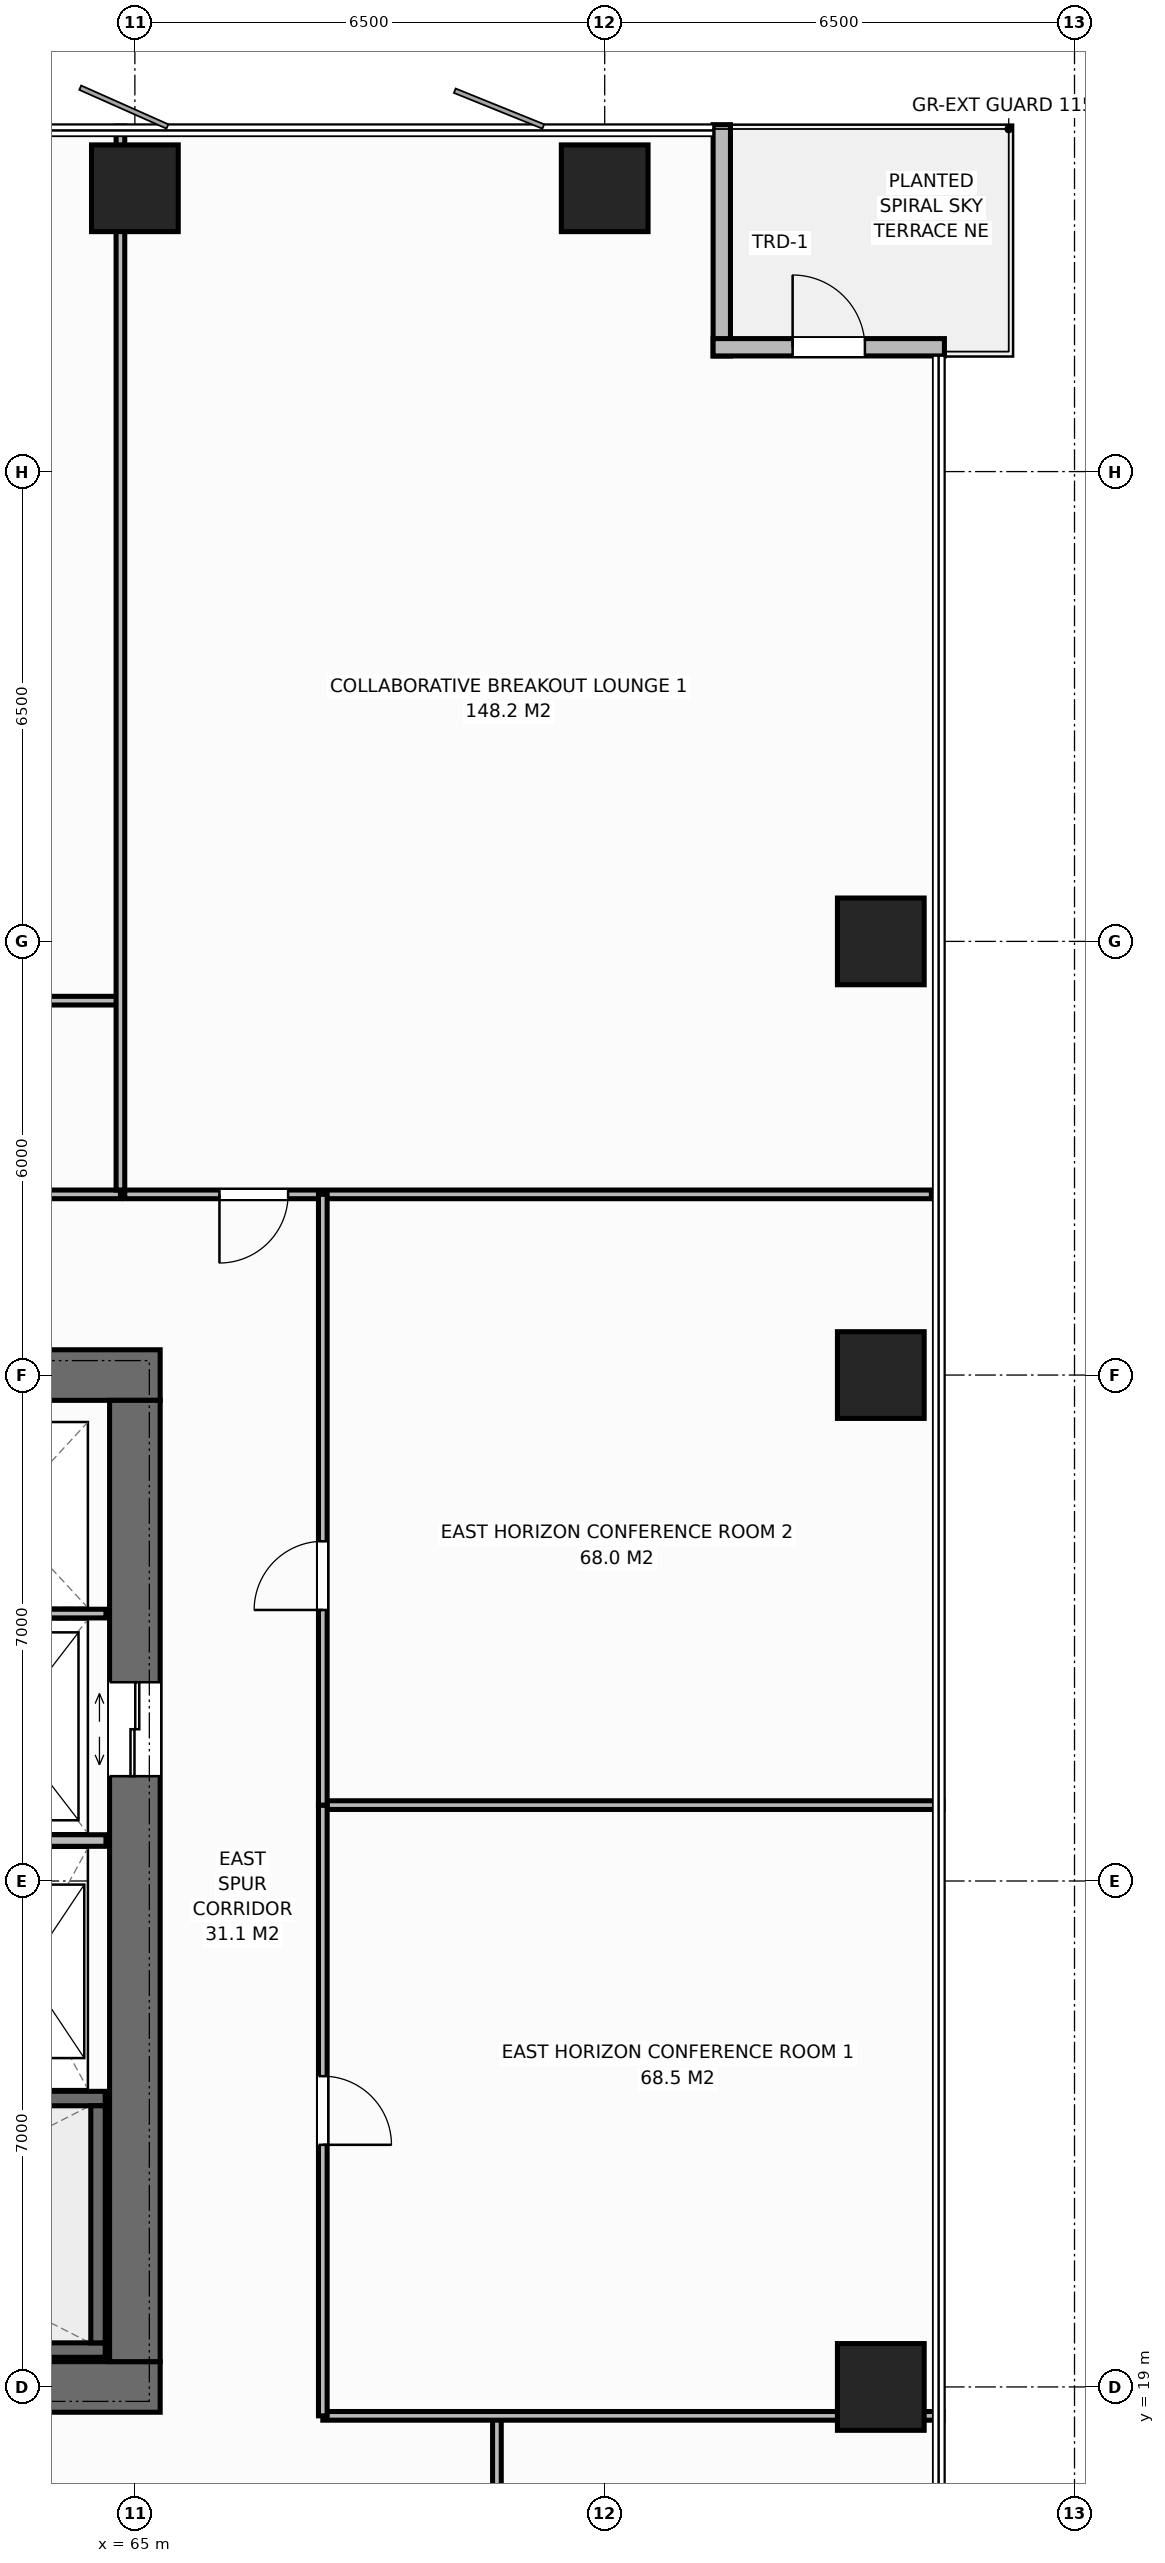
"""IFC4 building model, lengths in metres.
Left out: names, types, materials, properties, quantities, classifications, styles, units other than length and angle.
Written with IfcOpenShell. Run it as: python <this file> out.ifc"""

import sys

from ifc_helpers import new_model, si_unit, direction, frame, frame_2d, origin, origin_2d, place, context, subcontext, project, spatial, rectangle, extrude, element, fill, save


model = new_model("IFC4")
c1 = context("Model", 3, precision=1e-05, world=origin(), true_north=direction((0.0, 1.0)))
c2 = subcontext(c1, "Body", "Model", "MODEL_VIEW")
j1 = project(units=[si_unit("LENGTHUNIT", "METRE"), si_unit("PLANEANGLEUNIT", "RADIAN")], contexts=[c1])
p1 = place(None, origin())
s1 = spatial("IfcSite", under=j1, at=p1, CompositionType="ELEMENT")
p2 = place(p1, origin())
s2 = spatial("IfcBuilding", under=s1, at=p2, CompositionType="ELEMENT")
p3 = place(p2, frame((0.0, 0.0, 131.6)))
s3 = spatial("IfcBuildingStorey", under=s2, at=p3, CompositionType="ELEMENT", Elevation=131.6)
p4 = place(p3, frame((51.65, 19.0, 0.0), z_axis=(0.0, 0.0, 1.0), x_axis=(1.0, 0.0, 0.0)))
e1 = element("IfcWall", 1, at=p4, inside=s3, PredefinedType="SHEAR", context=c2, shape_type="SweptSolid", body=[
    extrude(rectangle(XDim=13.7, YDim=0.7, at=frame_2d((6.85, 0.0))), origin(), (0.0, 0.0, 1.0), 3.8),
])
p5 = place(p4, frame((3.07, 0.0, 0.0)))
e2 = element("IfcOpeningElement", 2, at=p5, cuts=e1, PredefinedType="OPENING", context=c2, shape_type="SweptSolid", body=[
    extrude(rectangle(XDim=1.4, YDim=2.2, at=frame_2d((0.7, 1.1))), frame((0.0, 0.36, 0.0), z_axis=(0.0, -1.0, 0.0), x_axis=(1.0, 0.0, 0.0)), (0.0, 0.0, 1.0), 0.72),
])
p6 = place(p3, frame((51.65, 33.0, 0.0), z_axis=(0.0, 0.0, 1.0), x_axis=(1.0, 0.0, 0.0)))
e3 = element("IfcWall", 3, at=p6, inside=s3, PredefinedType="SHEAR", context=c2, shape_type="SweptSolid", body=[
    extrude(rectangle(XDim=13.7, YDim=0.7, at=frame_2d((6.85, 0.0))), origin(), (0.0, 0.0, 1.0), 3.8),
])
p7 = place(p6, frame((3.07, 0.0, 0.0)))
e4 = element("IfcOpeningElement", 4, at=p7, cuts=e3, PredefinedType="OPENING", context=c2, shape_type="SweptSolid", body=[
    extrude(rectangle(XDim=1.4, YDim=2.2, at=frame_2d((0.7, 1.1))), frame((0.0, 0.36, 0.0), z_axis=(0.0, -1.0, 0.0), x_axis=(1.0, 0.0, 0.0)), (0.0, 0.0, 1.0), 0.72),
])
p8 = place(p6, frame((10.95, 0.0, 0.0)))
e5 = element("IfcOpeningElement", 5, at=p8, cuts=e3, PredefinedType="OPENING", context=c2, shape_type="SweptSolid", body=[
    extrude(rectangle(XDim=0.9, YDim=2.15, at=frame_2d((0.45, 1.075))), frame((0.0, 0.36, 0.0), z_axis=(0.0, -1.0, 0.0), x_axis=(1.0, 0.0, 0.0)), (0.0, 0.0, 1.0), 0.72),
])
p9 = place(p6, frame((5.9, 0.0, 0.0)))
e6 = element("IfcOpeningElement", 6, at=p9, cuts=e3, PredefinedType="OPENING", context=c2, shape_type="SweptSolid", body=[
    extrude(rectangle(XDim=0.9, YDim=2.15, at=frame_2d((0.45, 1.075))), frame((0.0, 0.36, 0.0), z_axis=(0.0, -1.0, 0.0), x_axis=(1.0, 0.0, 0.0)), (0.0, 0.0, 1.0), 0.72),
])
p10 = place(p6, frame((8.3, 0.0, 0.0)))
e7 = element("IfcOpeningElement", 7, at=p10, cuts=e3, PredefinedType="OPENING", context=c2, shape_type="SweptSolid", body=[
    extrude(rectangle(XDim=0.95, YDim=2.15, at=frame_2d((0.475, 1.075))), frame((0.0, 0.36, 0.0), z_axis=(0.0, -1.0, 0.0), x_axis=(1.0, 0.0, 0.0)), (0.0, 0.0, 1.0), 0.72),
])
p11 = place(p3, frame((65.0, 19.35, 0.0), z_axis=(0.0, 0.0, 1.0), x_axis=(0.0, 1.0, 0.0)))
e8 = element("IfcWall", 8, at=p11, inside=s3, PredefinedType="SHEAR", context=c2, shape_type="SweptSolid", body=[
    extrude(rectangle(XDim=13.3, YDim=0.7, at=frame_2d((6.65, 0.0))), origin(), (0.0, 0.0, 1.0), 3.8),
])
p12 = place(p11, frame((8.1, 0.0, 0.0)))
e9 = element("IfcOpeningElement", 9, at=p12, cuts=e8, PredefinedType="OPENING", context=c2, shape_type="SweptSolid", body=[
    extrude(rectangle(XDim=1.3, YDim=2.2, at=frame_2d((0.65, 1.1))), frame((0.0, 0.36, 0.0), z_axis=(0.0, -1.0, 0.0), x_axis=(1.0, 0.0, 0.0)), (0.0, 0.0, 1.0), 0.72),
])
p13 = place(p3, frame((56.16, 19.51, 0.0), z_axis=(0.0, 0.0, 1.0), x_axis=(1.0, 0.0, 0.0)))
e10 = element("IfcWall", 10, at=p13, inside=s3, PredefinedType="SHEAR", context=c2, shape_type="SweptSolid", body=[
    extrude(rectangle(XDim=8.43, YDim=0.2, at=frame_2d((4.215, 0.0))), origin(), (0.0, 0.0, 1.0), 3.8),
])
p14 = place(p3, frame((56.16, 22.99, 0.0), z_axis=(0.0, 0.0, 1.0), x_axis=(1.0, 0.0, 0.0)))
e11 = element("IfcWall", 11, at=p14, inside=s3, PredefinedType="SHEAR", context=c2, shape_type="SweptSolid", body=[
    extrude(rectangle(XDim=8.43, YDim=0.2, at=frame_2d((4.215, 0.0))), origin(), (0.0, 0.0, 1.0), 3.8),
])
p15 = place(p14, frame((0.45, 0.0, 0.0)))
e12 = element("IfcOpeningElement", 12, at=p15, cuts=e11, PredefinedType="OPENING", context=c2, shape_type="SweptSolid", body=[
    extrude(rectangle(XDim=1.0, YDim=2.15, at=frame_2d((0.5, 1.075))), frame((0.0, 0.11, 0.0), z_axis=(0.0, -1.0, 0.0), x_axis=(1.0, 0.0, 0.0)), (0.0, 0.0, 1.0), 0.22),
])
p16 = place(p3, frame((64.49, 19.61, 0.0), z_axis=(0.0, 0.0, 1.0), x_axis=(0.0, 1.0, 0.0)))
e13 = element("IfcWall", 13, at=p16, inside=s3, PredefinedType="SHEAR", context=c2, shape_type="SweptSolid", body=[
    extrude(rectangle(XDim=3.28, YDim=0.2, at=frame_2d((1.64, 0.0))), origin(), (0.0, 0.0, 1.0), 3.8),
])
for number, where, z_axis, x_axis in (
    (14, (65.0, 49.42, 0.0), (0.0, 0.0, 1.0), (1.0, 0.0, 0.0)),
    (15, (71.5, 49.42, 0.0), (0.0, 0.0, 1.0), (1.0, 0.0, 0.0)),
    (16, (75.32, 19.0, 0.0), (0.0, 0.0, 1.0), (1.0, 0.0, 0.0)),
    (17, (75.32, 33.0, 0.0), (0.0, 0.0, 1.0), (1.0, 0.0, 0.0)),
    (18, (75.32, 39.0, 0.0), (0.0, 0.0, 1.0), (1.0, 0.0, 0.0)),
):
    element("IfcColumn", number, at=place(p3, frame(where, z_axis=z_axis, x_axis=x_axis)), inside=s3, PredefinedType="COLUMN", context=c2, shape_type="SweptSolid", body=[
        extrude(rectangle(XDim=1.2, YDim=1.2, at=origin_2d()), origin(), (0.0, 0.0, 1.0), 3.8),
    ])
p17 = place(p3, frame((73.12, 50.3, 0.0), z_axis=(0.0, 0.0, 1.0), x_axis=(0.0, -1.0, 0.0)))
e19 = element("IfcWall", 19, at=p17, inside=s3, PredefinedType="STANDARD", context=c2, shape_type="SweptSolid", body=[
    extrude(rectangle(XDim=3.2, YDim=0.24, at=frame_2d((1.6, 0.0))), origin(), (0.0, 0.0, 1.0), 3.565),
])
p18 = place(p3, frame((73.0, 47.22, 0.0), z_axis=(0.0, 0.0, 1.0), x_axis=(1.0, 0.0, 0.0)))
e20 = element("IfcWall", 20, at=p18, inside=s3, PredefinedType="STANDARD", context=c2, shape_type="SweptSolid", body=[
    extrude(rectangle(XDim=3.2, YDim=0.24, at=frame_2d((1.6, 0.0))), origin(), (0.0, 0.0, 1.0), 3.565),
])
p19 = place(p18, frame((1.1, 0.0, 0.0)))
e21 = element("IfcOpeningElement", 21, at=p19, cuts=e20, PredefinedType="OPENING", context=c2, shape_type="SweptSolid", body=[
    extrude(rectangle(XDim=1.0, YDim=2.2, at=frame_2d((0.5, 1.1))), frame((0.0, 0.13, 0.0), z_axis=(0.0, -1.0, 0.0), x_axis=(1.0, 0.0, 0.0)), (0.0, 0.0, 1.0), 0.26),
])
p20 = place(p3, frame((56.26, 26.56, 0.0), z_axis=(0.0, 0.0, 1.0), x_axis=(1.0, 0.0, 0.0)))
e22 = element("IfcWall", 22, at=p20, inside=s3, PredefinedType="STANDARD", context=c2, shape_type="SweptSolid", body=[
    extrude(rectangle(XDim=8.34, YDim=0.16, at=frame_2d((4.17, 0.0))), origin(), (0.0, 0.0, 1.0), 3.565),
])
p21 = place(p3, frame((61.87, 29.7, 0.0), z_axis=(0.0, 0.0, 1.0), x_axis=(1.0, 0.0, 0.0)))
e23 = element("IfcWall", 23, at=p21, inside=s3, PredefinedType="PARTITIONING", context=c2, shape_type="SweptSolid", body=[
    extrude(rectangle(XDim=2.73, YDim=0.12, at=frame_2d((1.365, 0.0))), origin(), (0.0, 0.0, 1.0), 3.565),
])
p22 = place(p3, frame((70.009, 16.5, 0.0), z_axis=(0.0, 0.0, 1.0), x_axis=(0.0, 1.0, 0.0)))
e24 = element("IfcWall", 24, at=p22, inside=s3, PredefinedType="PARTITIONING", context=c2, shape_type="SweptSolid", body=[
    extrude(rectangle(XDim=2.1, YDim=0.12, at=frame_2d((1.05, 0.0))), origin(), (0.0, 0.0, 1.0), 3.565),
])
p23 = place(p3, frame((51.64, 35.5, 0.0), z_axis=(0.0, 0.0, 1.0), x_axis=(1.0, 0.0, 0.0)))
e25 = element("IfcWall", 25, at=p23, inside=s3, PredefinedType="PARTITIONING", context=c2, shape_type="SweptSolid", body=[
    extrude(rectangle(XDim=13.16, YDim=0.12, at=frame_2d((6.58, 0.0))), origin(), (0.0, 0.0, 1.0), 3.565),
])
p24 = place(p23, frame((1.51, 0.0, 0.0)))
e26 = element("IfcOpeningElement", 26, at=p24, cuts=e25, PredefinedType="OPENING", context=c2, shape_type="SweptSolid", body=[
    extrude(rectangle(XDim=0.9, YDim=2.15, at=frame_2d((0.45, 1.075))), frame((0.0, 0.07, 0.0), z_axis=(0.0, -1.0, 0.0), x_axis=(1.0, 0.0, 0.0)), (0.0, 0.0, 1.0), 0.14),
])
p25 = place(p23, frame((4.51, 0.0, 0.0)))
e27 = element("IfcOpeningElement", 27, at=p25, cuts=e25, PredefinedType="OPENING", context=c2, shape_type="SweptSolid", body=[
    extrude(rectangle(XDim=0.9, YDim=2.15, at=frame_2d((0.45, 1.075))), frame((0.0, 0.07, 0.0), z_axis=(0.0, -1.0, 0.0), x_axis=(1.0, 0.0, 0.0)), (0.0, 0.0, 1.0), 0.14),
])
p26 = place(p23, frame((8.36, 0.0, 0.0)))
e28 = element("IfcOpeningElement", 28, at=p26, cuts=e25, PredefinedType="OPENING", context=c2, shape_type="SweptSolid", body=[
    extrude(rectangle(XDim=0.9, YDim=2.15, at=frame_2d((0.45, 1.075))), frame((0.0, 0.07, 0.0), z_axis=(0.0, -1.0, 0.0), x_axis=(1.0, 0.0, 0.0)), (0.0, 0.0, 1.0), 0.14),
])
p27 = place(p23, frame((10.96, 0.0, 0.0)))
e29 = element("IfcOpeningElement", 29, at=p27, cuts=e25, PredefinedType="OPENING", context=c2, shape_type="SweptSolid", body=[
    extrude(rectangle(XDim=0.95, YDim=2.15, at=frame_2d((0.475, 1.075))), frame((0.0, 0.07, 0.0), z_axis=(0.0, -1.0, 0.0), x_axis=(1.0, 0.0, 0.0)), (0.0, 0.0, 1.0), 0.14),
])
p28 = place(p3, frame((51.64, 38.18, 0.0), z_axis=(0.0, 0.0, 1.0), x_axis=(1.0, 0.0, 0.0)))
e30 = element("IfcWall", 30, at=p28, inside=s3, PredefinedType="PARTITIONING", context=c2, shape_type="SweptSolid", body=[
    extrude(rectangle(XDim=13.16, YDim=0.12, at=frame_2d((6.58, 0.0))), origin(), (0.0, 0.0, 1.0), 3.565),
])
p29 = place(p3, frame((64.8, 35.56, 0.0), z_axis=(0.0, 0.0, 1.0), x_axis=(0.0, 1.0, 0.0)))
e31 = element("IfcWall", 31, at=p29, inside=s3, PredefinedType="PARTITIONING", context=c2, shape_type="SweptSolid", body=[
    extrude(rectangle(XDim=14.72, YDim=0.12, at=frame_2d((7.36, 0.0))), origin(), (0.0, 0.0, 1.0), 2.965),
])
p30 = place(p3, frame((64.86, 35.5, 0.0), z_axis=(0.0, 0.0, 1.0), x_axis=(1.0, 0.0, 0.0)))
e32 = element("IfcWall", 32, at=p30, inside=s3, PredefinedType="PARTITIONING", context=c2, shape_type="SweptSolid", body=[
    extrude(rectangle(XDim=11.16, YDim=0.12, at=frame_2d((5.58, 0.0))), origin(), (0.0, 0.0, 1.0), 3.565),
])
p31 = place(p30, frame((1.31, 0.0, 0.0)))
e33 = element("IfcOpeningElement", 33, at=p31, cuts=e32, PredefinedType="OPENING", context=c2, shape_type="SweptSolid", body=[
    extrude(rectangle(XDim=0.95, YDim=2.15, at=frame_2d((0.475, 1.075))), frame((0.0, 0.07, 0.0), z_axis=(0.0, -1.0, 0.0), x_axis=(1.0, 0.0, 0.0)), (0.0, 0.0, 1.0), 0.14),
])
for number, where, z_axis, x_axis in (
    (34, (67.6, 18.6, 0.0), (0.0, 0.0, 1.0), (1.0, 0.0, 0.0)),
    (35, (67.6, 27.05, 0.0), (0.0, 0.0, 1.0), (1.0, 0.0, 0.0)),
):
    element("IfcWall", number, at=place(p3, frame(where, z_axis=z_axis, x_axis=x_axis)), inside=s3, PredefinedType="PARTITIONING", context=c2, shape_type="SweptSolid", body=[
        extrude(rectangle(XDim=8.58, YDim=0.12, at=frame_2d((4.29, 0.0))), origin(), (0.0, 0.0, 1.0), 3.565),
    ])
p32 = place(p3, frame((67.6, 18.6, 0.0), z_axis=(0.0, 0.0, 1.0), x_axis=(0.0, 1.0, 0.0)))
e36 = element("IfcWall", 36, at=p32, inside=s3, PredefinedType="PARTITIONING", context=c2, shape_type="SweptSolid", body=[
    extrude(rectangle(XDim=8.45, YDim=0.12, at=frame_2d((4.225, 0.0))), origin(), (0.0, 0.0, 1.0), 3.565),
])
p33 = place(p32, frame((3.75, 0.0, 0.0)))
e37 = element("IfcOpeningElement", 37, at=p33, cuts=e36, PredefinedType="OPENING", context=c2, shape_type="SweptSolid", body=[
    extrude(rectangle(XDim=0.95, YDim=2.15, at=frame_2d((0.475, 1.075))), frame((0.0, 0.07, 0.0), z_axis=(0.0, -1.0, 0.0), x_axis=(1.0, 0.0, 0.0)), (0.0, 0.0, 1.0), 0.14),
])
p34 = place(p3, frame((67.6, 27.05, 0.0), z_axis=(0.0, 0.0, 1.0), x_axis=(0.0, 1.0, 0.0)))
e38 = element("IfcWall", 38, at=p34, inside=s3, PredefinedType="PARTITIONING", context=c2, shape_type="SweptSolid", body=[
    extrude(rectangle(XDim=8.45, YDim=0.12, at=frame_2d((4.225, 0.0))), origin(), (0.0, 0.0, 1.0), 3.565),
])
p35 = place(p34, frame((2.7, 0.0, 0.0)))
e39 = element("IfcOpeningElement", 39, at=p35, cuts=e38, PredefinedType="OPENING", context=c2, shape_type="SweptSolid", body=[
    extrude(rectangle(XDim=0.95, YDim=2.15, at=frame_2d((0.475, 1.075))), frame((0.0, 0.07, 0.0), z_axis=(0.0, -1.0, 0.0), x_axis=(1.0, 0.0, 0.0)), (0.0, 0.0, 1.0), 0.14),
])
p36 = place(p19, origin())
e40 = element("IfcDoor", 40, at=p36, inside=s3, OperationType="SINGLE_SWING_LEFT", PredefinedType="DOOR", context=c2, shape_type="SweptSolid", body=[
    extrude(rectangle(XDim=1.0, YDim=2.2, at=frame_2d((0.5, 1.1))), frame((0.0, 0.025, 0.0), z_axis=(0.0, -1.0, 0.0), x_axis=(1.0, 0.0, 0.0)), (0.0, 0.0, 1.0), 0.05),
])
fill(e21, e40)
p37 = place(p12, origin())
e41 = element("IfcDoor", 41, at=p37, inside=s3, OperationType="DOUBLE_DOOR_SLIDING", PredefinedType="DOOR", context=c2, shape_type="SweptSolid", body=[
    extrude(rectangle(XDim=1.3, YDim=2.2, at=frame_2d((0.65, 1.1))), frame((0.0, 0.025, 0.0), z_axis=(0.0, -1.0, 0.0), x_axis=(1.0, 0.0, 0.0)), (0.0, 0.0, 1.0), 0.05),
])
fill(e9, e41)
p38 = place(p31, origin())
e42 = element("IfcDoor", 42, at=p38, inside=s3, OperationType="SINGLE_SWING_RIGHT", PredefinedType="DOOR", context=c2, shape_type="SweptSolid", body=[
    extrude(rectangle(XDim=0.95, YDim=2.15, at=frame_2d((0.475, 1.075))), frame((0.0, 0.025, 0.0), z_axis=(0.0, -1.0, 0.0), x_axis=(1.0, 0.0, 0.0)), (0.0, 0.0, 1.0), 0.05),
])
fill(e33, e42)
p39 = place(p33, origin())
e43 = element("IfcDoor", 43, at=p39, inside=s3, OperationType="SINGLE_SWING_RIGHT", PredefinedType="DOOR", context=c2, shape_type="SweptSolid", body=[
    extrude(rectangle(XDim=0.95, YDim=2.15, at=frame_2d((0.475, 1.075))), frame((0.0, 0.025, 0.0), z_axis=(0.0, -1.0, 0.0), x_axis=(1.0, 0.0, 0.0)), (0.0, 0.0, 1.0), 0.05),
])
fill(e37, e43)
p40 = place(p35, origin())
e44 = element("IfcDoor", 44, at=p40, inside=s3, OperationType="SINGLE_SWING_LEFT", PredefinedType="DOOR", context=c2, shape_type="SweptSolid", body=[
    extrude(rectangle(XDim=0.95, YDim=2.15, at=frame_2d((0.475, 1.075))), frame((0.0, 0.025, 0.0), z_axis=(0.0, -1.0, 0.0), x_axis=(1.0, 0.0, 0.0)), (0.0, 0.0, 1.0), 0.05),
])
fill(e39, e44)
save(model, sys.argv[1])
